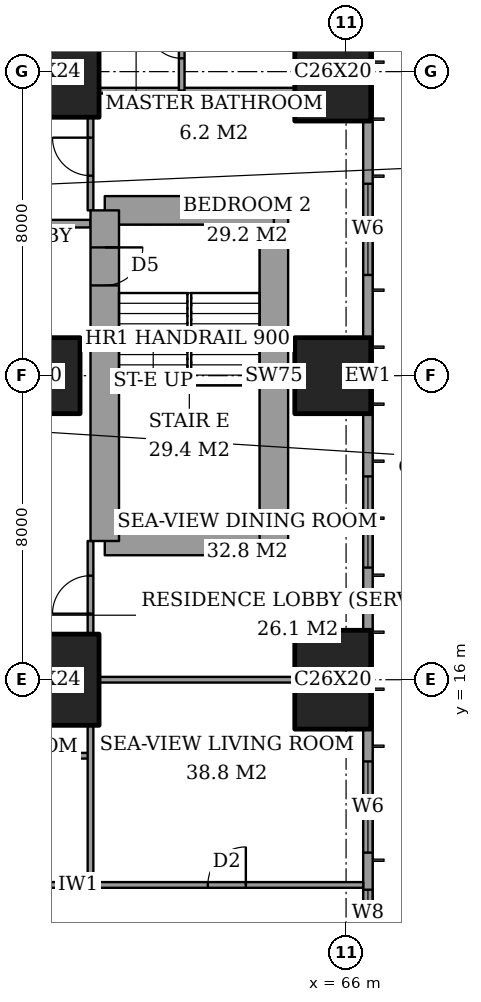
"""IFC4 building model, lengths in metres.
Left out: names, types, materials, properties, quantities, classifications, styles, units other than length and angle.
Written with IfcOpenShell. Run it as: python <this file> out.ifc"""

import sys

from ifc_helpers import new_model, si_unit, direction, frame, frame_2d, origin, origin_2d, place, context, subcontext, project, spatial, rectangle, extrude, element, fill, save


model = new_model("IFC4")
c1 = context("Model", 3, precision=1e-05, world=origin(), true_north=direction((0.0, 1.0)))
c2 = subcontext(c1, "Body", "Model", "MODEL_VIEW")
j1 = project(units=[si_unit("LENGTHUNIT", "METRE"), si_unit("PLANEANGLEUNIT", "RADIAN")], contexts=[c1])
p1 = place(None, origin())
s1 = spatial("IfcSite", under=j1, at=p1, CompositionType="ELEMENT")
p2 = place(p1, origin())
s2 = spatial("IfcBuilding", under=s1, at=p2, CompositionType="ELEMENT")
p3 = place(p2, frame((0.0, 0.0, 76.4)))
s3 = spatial("IfcBuildingStorey", under=s2, at=p3, CompositionType="ELEMENT", Elevation=76.4)
p4 = place(p3, frame((58.0, 16.0, 0.0), z_axis=(0.0, 0.0, 1.0), x_axis=(1.0, 0.0, 0.0)))
e1 = element("IfcColumn", 1, at=p4, inside=s3, PredefinedType="COLUMN", context=c2, shape_type="SweptSolid", body=[
    extrude(rectangle(XDim=3.0, YDim=2.4, at=origin_2d()), origin(), (0.0, 0.0, 1.0), 3.6),
])
p5 = place(p3, frame((58.0, 24.0, 0.0), z_axis=(0.0, 0.0, 1.0), x_axis=(1.0, 0.0, 0.0)))
e2 = element("IfcColumn", 2, at=p5, inside=s3, PredefinedType="COLUMN", context=c2, shape_type="SweptSolid", body=[
    extrude(rectangle(XDim=2.0, YDim=2.0, at=origin_2d()), origin(), (0.0, 0.0, 1.0), 3.6),
])
p6 = place(p3, frame((58.0, 32.0, 0.0), z_axis=(0.0, 0.0, 1.0), x_axis=(1.0, 0.0, 0.0)))
e3 = element("IfcColumn", 3, at=p6, inside=s3, PredefinedType="COLUMN", context=c2, shape_type="SweptSolid", body=[
    extrude(rectangle(XDim=3.0, YDim=2.4, at=origin_2d()), origin(), (0.0, 0.0, 1.0), 3.6),
])
p7 = place(p3, frame((65.65, 16.0, 0.0), z_axis=(0.0, 0.0, 1.0), x_axis=(0.0, 1.0, 0.0)))
e4 = element("IfcColumn", 4, at=p7, inside=s3, PredefinedType="COLUMN", context=c2, shape_type="SweptSolid", body=[
    extrude(rectangle(XDim=2.6, YDim=2.0, at=origin_2d()), origin(), (0.0, 0.0, 1.0), 3.6),
])
p8 = place(p3, frame((65.65, 24.0, 0.0), z_axis=(0.0, 0.0, 1.0), x_axis=(1.0, 0.0, 0.0)))
e5 = element("IfcColumn", 5, at=p8, inside=s3, PredefinedType="COLUMN", context=c2, shape_type="SweptSolid", body=[
    extrude(rectangle(XDim=2.0, YDim=2.0, at=origin_2d()), origin(), (0.0, 0.0, 1.0), 3.6),
])
p9 = place(p3, frame((65.65, 32.0, 0.0), z_axis=(0.0, 0.0, 1.0), x_axis=(0.0, 1.0, 0.0)))
e6 = element("IfcColumn", 6, at=p9, inside=s3, PredefinedType="COLUMN", context=c2, shape_type="SweptSolid", body=[
    extrude(rectangle(XDim=2.6, YDim=2.0, at=origin_2d()), origin(), (0.0, 0.0, 1.0), 3.6),
])
p10 = place(p3, frame((59.65, 19.65, 0.0), z_axis=(0.0, 0.0, 1.0), x_axis=(1.0, 0.0, 0.0)))
e7 = element("IfcWall", 7, at=p10, inside=s3, PredefinedType="SHEAR", context=c2, shape_type="SweptSolid", body=[
    extrude(rectangle(XDim=4.45, YDim=0.75, at=frame_2d((2.225, 0.0))), origin(), (0.0, 0.0, 1.0), 3.6),
])
p11 = place(p3, frame((64.1, 19.65, 0.0), z_axis=(0.0, 0.0, 1.0), x_axis=(0.0, 1.0, 0.0)))
e8 = element("IfcWall", 8, at=p11, inside=s3, PredefinedType="SHEAR", context=c2, shape_type="SweptSolid", body=[
    extrude(rectangle(XDim=8.7, YDim=0.75, at=frame_2d((4.35, 0.0))), origin(), (0.0, 0.0, 1.0), 3.6),
])
p12 = place(p3, frame((64.1, 28.35, 0.0), z_axis=(0.0, 0.0, 1.0), x_axis=(-1.0, 0.0, 0.0)))
e9 = element("IfcWall", 9, at=p12, inside=s3, PredefinedType="SHEAR", context=c2, shape_type="SweptSolid", body=[
    extrude(rectangle(XDim=4.45, YDim=0.75, at=frame_2d((2.225, 0.0))), origin(), (0.0, 0.0, 1.0), 3.6),
])
p13 = place(p3, frame((59.65, 28.35, 0.0), z_axis=(0.0, 0.0, 1.0), x_axis=(0.0, -1.0, 0.0)))
e10 = element("IfcWall", 10, at=p13, inside=s3, PredefinedType="SHEAR", context=c2, shape_type="SweptSolid", body=[
    extrude(rectangle(XDim=8.7, YDim=0.75, at=frame_2d((4.35, 0.0))), origin(), (0.0, 0.0, 1.0), 3.6),
])
p14 = place(p13, frame((0.975, 0.0, 0.0)))
e11 = element("IfcOpeningElement", 11, at=p14, cuts=e10, PredefinedType="OPENING", context=c2, shape_type="SweptSolid", body=[
    extrude(rectangle(XDim=1.0, YDim=2.1, at=frame_2d((0.5, 1.05))), frame((0.0, 0.385, 0.0), z_axis=(0.0, -1.0, 0.0), x_axis=(1.0, 0.0, 0.0)), (0.0, 0.0, 1.0), 0.77),
])
p15 = place(p3, frame((66.575, 3.175, 0.0), z_axis=(0.0, 0.0, 1.0), x_axis=(0.0, 1.0, 0.0)))
e12 = element("IfcWall", 12, at=p15, inside=s3, PredefinedType="SOLIDWALL", context=c2, shape_type="SweptSolid", body=[
    extrude(rectangle(XDim=41.65, YDim=0.25, at=frame_2d((20.825, 0.0))), origin(), (0.0, 0.0, 1.0), 3.6),
])
p16 = place(p15, frame((0.775, 0.0, 0.6)))
e13 = element("IfcOpeningElement", 13, at=p16, cuts=e12, PredefinedType="OPENING", context=c2, shape_type="SweptSolid", body=[
    extrude(rectangle(XDim=2.4, YDim=2.0, at=frame_2d((1.2, 1.0))), frame((0.0, 0.135, 0.0), z_axis=(0.0, -1.0, 0.0), x_axis=(1.0, 0.0, 0.0)), (0.0, 0.0, 1.0), 0.27),
])
p17 = place(p15, frame((6.1, 0.0, 0.6)))
e14 = element("IfcOpeningElement", 14, at=p17, cuts=e12, PredefinedType="OPENING", context=c2, shape_type="SweptSolid", body=[
    extrude(rectangle(XDim=1.2, YDim=2.0, at=frame_2d((0.6, 1.0))), frame((0.0, 0.135, 0.0), z_axis=(0.0, -1.0, 0.0), x_axis=(1.0, 0.0, 0.0)), (0.0, 0.0, 1.0), 0.27),
])
p18 = place(p15, frame((8.275, 0.0, 0.6)))
e15 = element("IfcOpeningElement", 15, at=p18, cuts=e12, PredefinedType="OPENING", context=c2, shape_type="SweptSolid", body=[
    extrude(rectangle(XDim=2.4, YDim=2.0, at=frame_2d((1.2, 1.0))), frame((0.0, 0.135, 0.0), z_axis=(0.0, -1.0, 0.0), x_axis=(1.0, 0.0, 0.0)), (0.0, 0.0, 1.0), 0.27),
])
p19 = place(p15, frame((15.775, 0.0, 0.6)))
e16 = element("IfcOpeningElement", 16, at=p19, cuts=e12, PredefinedType="OPENING", context=c2, shape_type="SweptSolid", body=[
    extrude(rectangle(XDim=2.4, YDim=2.0, at=frame_2d((1.2, 1.0))), frame((0.0, 0.135, 0.0), z_axis=(0.0, -1.0, 0.0), x_axis=(1.0, 0.0, 0.0)), (0.0, 0.0, 1.0), 0.27),
])
p20 = place(p15, frame((23.475, 0.0, 0.6)))
e17 = element("IfcOpeningElement", 17, at=p20, cuts=e12, PredefinedType="OPENING", context=c2, shape_type="SweptSolid", body=[
    extrude(rectangle(XDim=2.4, YDim=2.0, at=frame_2d((1.2, 1.0))), frame((0.0, 0.135, 0.0), z_axis=(0.0, -1.0, 0.0), x_axis=(1.0, 0.0, 0.0)), (0.0, 0.0, 1.0), 0.27),
])
p21 = place(p15, frame((30.975, 0.0, 0.6)))
e18 = element("IfcOpeningElement", 18, at=p21, cuts=e12, PredefinedType="OPENING", context=c2, shape_type="SweptSolid", body=[
    extrude(rectangle(XDim=2.4, YDim=2.0, at=frame_2d((1.2, 1.0))), frame((0.0, 0.135, 0.0), z_axis=(0.0, -1.0, 0.0), x_axis=(1.0, 0.0, 0.0)), (0.0, 0.0, 1.0), 0.27),
])
p22 = place(p15, frame((34.5, 0.0, 0.6)))
e19 = element("IfcOpeningElement", 19, at=p22, cuts=e12, PredefinedType="OPENING", context=c2, shape_type="SweptSolid", body=[
    extrude(rectangle(XDim=1.2, YDim=2.0, at=frame_2d((0.6, 1.0))), frame((0.0, 0.135, 0.0), z_axis=(0.0, -1.0, 0.0), x_axis=(1.0, 0.0, 0.0)), (0.0, 0.0, 1.0), 0.27),
])
p23 = place(p15, frame((38.475, 0.0, 0.6)))
e20 = element("IfcOpeningElement", 20, at=p23, cuts=e12, PredefinedType="OPENING", context=c2, shape_type="SweptSolid", body=[
    extrude(rectangle(XDim=2.4, YDim=2.0, at=frame_2d((1.2, 1.0))), frame((0.0, 0.135, 0.0), z_axis=(0.0, -1.0, 0.0), x_axis=(1.0, 0.0, 0.0)), (0.0, 0.0, 1.0), 0.27),
])
p24 = place(p3, frame((41.439, 10.6, 0.0), z_axis=(0.0, 0.0, 1.0), x_axis=(1.0, 0.0, 0.0)))
e21 = element("IfcWall", 21, at=p24, inside=s3, PredefinedType="PARTITIONING", context=c2, shape_type="SweptSolid", body=[
    extrude(rectangle(XDim=25.011, YDim=0.15, at=frame_2d((12.505, 0.0))), origin(), (0.0, 0.0, 1.0), 3.35),
])
p25 = place(p24, frame((10.761, 0.0, 0.0)))
e22 = element("IfcOpeningElement", 22, at=p25, cuts=e21, PredefinedType="OPENING", context=c2, shape_type="SweptSolid", body=[
    extrude(rectangle(XDim=1.0, YDim=2.1, at=frame_2d((0.5, 1.05))), frame((0.0, 0.085, 0.0), z_axis=(0.0, -1.0, 0.0), x_axis=(1.0, 0.0, 0.0)), (0.0, 0.0, 1.0), 0.17),
])
p26 = place(p24, frame((20.924, 0.0, 0.0)))
e23 = element("IfcOpeningElement", 23, at=p26, cuts=e21, PredefinedType="OPENING", context=c2, shape_type="SweptSolid", body=[
    extrude(rectangle(XDim=1.0, YDim=2.1, at=frame_2d((0.5, 1.05))), frame((0.0, 0.085, 0.0), z_axis=(0.0, -1.0, 0.0), x_axis=(1.0, 0.0, 0.0)), (0.0, 0.0, 1.0), 0.17),
])
p27 = place(p24, frame((15.749, 0.0, 0.0)))
e24 = element("IfcOpeningElement", 24, at=p27, cuts=e21, PredefinedType="OPENING", context=c2, shape_type="SweptSolid", body=[
    extrude(rectangle(XDim=0.9, YDim=2.1, at=frame_2d((0.45, 1.05))), frame((0.0, 0.085, 0.0), z_axis=(0.0, -1.0, 0.0), x_axis=(1.0, 0.0, 0.0)), (0.0, 0.0, 1.0), 0.17),
])
p28 = place(p24, frame((12.961, 0.0, 0.0)))
e25 = element("IfcOpeningElement", 25, at=p28, cuts=e21, PredefinedType="OPENING", context=c2, shape_type="SweptSolid", body=[
    extrude(rectangle(XDim=1.0, YDim=2.1, at=frame_2d((0.5, 1.05))), frame((0.0, 0.085, 0.0), z_axis=(0.0, -1.0, 0.0), x_axis=(1.0, 0.0, 0.0)), (0.0, 0.0, 1.0), 0.17),
])
p29 = place(p24, frame((7.861, 0.0, 0.0)))
e26 = element("IfcOpeningElement", 26, at=p29, cuts=e21, PredefinedType="OPENING", context=c2, shape_type="SweptSolid", body=[
    extrude(rectangle(XDim=1.0, YDim=2.1, at=frame_2d((0.5, 1.05))), frame((0.0, 0.085, 0.0), z_axis=(0.0, -1.0, 0.0), x_axis=(1.0, 0.0, 0.0)), (0.0, 0.0, 1.0), 0.17),
])
p30 = place(p24, frame((2.836, 0.0, 0.0)))
e27 = element("IfcOpeningElement", 27, at=p30, cuts=e21, PredefinedType="OPENING", context=c2, shape_type="SweptSolid", body=[
    extrude(rectangle(XDim=1.0, YDim=2.1, at=frame_2d((0.5, 1.05))), frame((0.0, 0.085, 0.0), z_axis=(0.0, -1.0, 0.0), x_axis=(1.0, 0.0, 0.0)), (0.0, 0.0, 1.0), 0.17),
])
p31 = place(p3, frame((56.0, 14.0, 0.0), z_axis=(0.0, 0.0, 1.0), x_axis=(1.0, 0.0, 0.0)))
e28 = element("IfcWall", 28, at=p31, inside=s3, PredefinedType="PARTITIONING", context=c2, shape_type="SweptSolid", body=[
    extrude(rectangle(XDim=3.275, YDim=0.15, at=frame_2d((1.637, 0.0))), origin(), (0.0, 0.0, 1.0), 3.35),
])
p32 = place(p3, frame((59.5, 16.0, 0.0), z_axis=(0.0, 0.0, 1.0), x_axis=(1.0, 0.0, 0.0)))
e29 = element("IfcWall", 29, at=p32, inside=s3, PredefinedType="PARTITIONING", context=c2, shape_type="SweptSolid", body=[
    extrude(rectangle(XDim=5.15, YDim=0.15, at=frame_2d((2.575, 0.0))), origin(), (0.0, 0.0, 1.0), 2.634),
])
p33 = place(p3, frame((42.0, 28.0, 0.0), z_axis=(0.0, 0.0, 1.0), x_axis=(1.0, 0.0, 0.0)))
e30 = element("IfcWall", 30, at=p33, inside=s3, PredefinedType="PARTITIONING", context=c2, shape_type="SweptSolid", body=[
    extrude(rectangle(XDim=17.275, YDim=0.2, at=frame_2d((8.637, 0.0))), origin(), (0.0, 0.0, 1.0), 3.35),
])
p34 = place(p33, frame((9.5, 0.0, 0.0)))
e31 = element("IfcOpeningElement", 31, at=p34, cuts=e30, PredefinedType="OPENING", context=c2, shape_type="SweptSolid", body=[
    extrude(rectangle(XDim=1.2, YDim=2.4, at=frame_2d((0.6, 1.2))), frame((0.0, 0.11, 0.0), z_axis=(0.0, -1.0, 0.0), x_axis=(1.0, 0.0, 0.0)), (0.0, 0.0, 1.0), 0.22),
])
p35 = place(p3, frame((59.5, 31.5, 0.0), z_axis=(0.0, 0.0, 1.0), x_axis=(1.0, 0.0, 0.0)))
e32 = element("IfcWall", 32, at=p35, inside=s3, PredefinedType="PARTITIONING", context=c2, shape_type="SweptSolid", body=[
    extrude(rectangle(XDim=5.15, YDim=0.15, at=frame_2d((2.575, 0.0))), origin(), (0.0, 0.0, 1.0), 3.35),
])
p36 = place(p3, frame((59.275, 10.6, 0.0), z_axis=(0.0, 0.0, 1.0), x_axis=(0.0, 1.0, 0.0)))
e33 = element("IfcWall", 33, at=p36, inside=s3, PredefinedType="PARTITIONING", context=c2, shape_type="SweptSolid", body=[
    extrude(rectangle(XDim=4.2, YDim=0.15, at=frame_2d((2.1, 0.0))), origin(), (0.0, 0.0, 1.0), 3.35),
])
p37 = place(p3, frame((59.275, 17.2, 0.0), z_axis=(0.0, 0.0, 1.0), x_axis=(0.0, 1.0, 0.0)))
e34 = element("IfcWall", 34, at=p37, inside=s3, PredefinedType="PARTITIONING", context=c2, shape_type="SweptSolid", body=[
    extrude(rectangle(XDim=2.45, YDim=0.15, at=frame_2d((1.225, 0.0))), origin(), (0.0, 0.0, 1.0), 3.35),
])
p38 = place(p37, frame((0.538, 0.0, 0.0)))
e35 = element("IfcOpeningElement", 35, at=p38, cuts=e34, PredefinedType="OPENING", context=c2, shape_type="SweptSolid", body=[
    extrude(rectangle(XDim=1.0, YDim=2.1, at=frame_2d((0.5, 1.05))), frame((0.0, 0.085, 0.0), z_axis=(0.0, -1.0, 0.0), x_axis=(1.0, 0.0, 0.0)), (0.0, 0.0, 1.0), 0.17),
])
p39 = place(p3, frame((59.275, 28.35, 0.0), z_axis=(0.0, 0.0, 1.0), x_axis=(0.0, 1.0, 0.0)))
e36 = element("IfcWall", 36, at=p39, inside=s3, PredefinedType="PARTITIONING", context=c2, shape_type="SweptSolid", body=[
    extrude(rectangle(XDim=2.45, YDim=0.15, at=frame_2d((1.225, 0.0))), origin(), (0.0, 0.0, 1.0), 3.35),
])
p40 = place(p39, frame((0.913, 0.0, 0.0)))
e37 = element("IfcOpeningElement", 37, at=p40, cuts=e36, PredefinedType="OPENING", context=c2, shape_type="SweptSolid", body=[
    extrude(rectangle(XDim=1.0, YDim=2.1, at=frame_2d((0.5, 1.05))), frame((0.0, 0.085, 0.0), z_axis=(0.0, -1.0, 0.0), x_axis=(1.0, 0.0, 0.0)), (0.0, 0.0, 1.0), 0.17),
])
p41 = place(p3, frame((61.675, 31.5, 0.0), z_axis=(0.0, 0.0, 1.0), x_axis=(0.0, 1.0, 0.0)))
e38 = element("IfcWall", 38, at=p41, inside=s3, PredefinedType="PARTITIONING", context=c2, shape_type="SweptSolid", body=[
    extrude(rectangle(XDim=2.6, YDim=0.15, at=frame_2d((1.3, 0.0))), origin(), (0.0, 0.0, 1.0), 3.35),
])
p42 = place(p41, frame((0.85, 0.0, 0.0)))
e39 = element("IfcOpeningElement", 39, at=p42, cuts=e38, PredefinedType="OPENING", context=c2, shape_type="SweptSolid", body=[
    extrude(rectangle(XDim=0.9, YDim=2.1, at=frame_2d((0.45, 1.05))), frame((0.0, 0.085, 0.0), z_axis=(0.0, -1.0, 0.0), x_axis=(1.0, 0.0, 0.0)), (0.0, 0.0, 1.0), 0.17),
])
p43 = place(p17, origin())
e40 = element("IfcWindow", 40, at=p43, inside=s3, PartitioningType="SINGLE_PANEL", PredefinedType="WINDOW", context=c2, shape_type="SweptSolid", body=[
    extrude(rectangle(XDim=1.2, YDim=2.0, at=frame_2d((0.6, 1.0))), frame((0.0, 0.03, 0.0), z_axis=(0.0, -1.0, 0.0), x_axis=(1.0, 0.0, 0.0)), (0.0, 0.0, 1.0), 0.06),
])
fill(e14, e40)
p44 = place(p18, origin())
e41 = element("IfcWindow", 41, at=p44, inside=s3, PartitioningType="SINGLE_PANEL", PredefinedType="WINDOW", context=c2, shape_type="SweptSolid", body=[
    extrude(rectangle(XDim=2.4, YDim=2.0, at=frame_2d((1.2, 1.0))), frame((0.0, 0.03, 0.0), z_axis=(0.0, -1.0, 0.0), x_axis=(1.0, 0.0, 0.0)), (0.0, 0.0, 1.0), 0.06),
])
fill(e15, e41)
p45 = place(p19, origin())
e42 = element("IfcWindow", 42, at=p45, inside=s3, PartitioningType="SINGLE_PANEL", PredefinedType="WINDOW", context=c2, shape_type="SweptSolid", body=[
    extrude(rectangle(XDim=2.4, YDim=2.0, at=frame_2d((1.2, 1.0))), frame((0.0, 0.03, 0.0), z_axis=(0.0, -1.0, 0.0), x_axis=(1.0, 0.0, 0.0)), (0.0, 0.0, 1.0), 0.06),
])
fill(e16, e42)
p46 = place(p20, origin())
e43 = element("IfcWindow", 43, at=p46, inside=s3, PartitioningType="SINGLE_PANEL", PredefinedType="WINDOW", context=c2, shape_type="SweptSolid", body=[
    extrude(rectangle(XDim=2.4, YDim=2.0, at=frame_2d((1.2, 1.0))), frame((0.0, 0.03, 0.0), z_axis=(0.0, -1.0, 0.0), x_axis=(1.0, 0.0, 0.0)), (0.0, 0.0, 1.0), 0.06),
])
fill(e17, e43)
p47 = place(p26, origin())
e44 = element("IfcDoor", 44, at=p47, inside=s3, OperationType="SINGLE_SWING_LEFT", PredefinedType="DOOR", context=c2, shape_type="SweptSolid", body=[
    extrude(rectangle(XDim=1.0, YDim=2.1, at=frame_2d((0.5, 1.05))), frame((0.0, 0.025, 0.0), z_axis=(0.0, -1.0, 0.0), x_axis=(1.0, 0.0, 0.0)), (0.0, 0.0, 1.0), 0.05),
])
fill(e23, e44)
p48 = place(p38, origin())
e45 = element("IfcDoor", 45, at=p48, inside=s3, OperationType="SINGLE_SWING_RIGHT", PredefinedType="DOOR", context=c2, shape_type="SweptSolid", body=[
    extrude(rectangle(XDim=1.0, YDim=2.1, at=frame_2d((0.5, 1.05))), frame((0.0, 0.025, 0.0), z_axis=(0.0, -1.0, 0.0), x_axis=(1.0, 0.0, 0.0)), (0.0, 0.0, 1.0), 0.05),
])
fill(e35, e45)
p49 = place(p42, origin())
e46 = element("IfcDoor", 46, at=p49, inside=s3, OperationType="SINGLE_SWING_LEFT", PredefinedType="DOOR", context=c2, shape_type="SweptSolid", body=[
    extrude(rectangle(XDim=0.9, YDim=2.1, at=frame_2d((0.45, 1.05))), frame((0.0, 0.025, 0.0), z_axis=(0.0, -1.0, 0.0), x_axis=(1.0, 0.0, 0.0)), (0.0, 0.0, 1.0), 0.05),
])
fill(e39, e46)
p50 = place(p40, origin())
e47 = element("IfcDoor", 47, at=p50, inside=s3, OperationType="SINGLE_SWING_LEFT", PredefinedType="DOOR", context=c2, shape_type="SweptSolid", body=[
    extrude(rectangle(XDim=1.0, YDim=2.1, at=frame_2d((0.5, 1.05))), frame((0.0, 0.025, 0.0), z_axis=(0.0, -1.0, 0.0), x_axis=(1.0, 0.0, 0.0)), (0.0, 0.0, 1.0), 0.05),
])
fill(e37, e47)
p51 = place(p14, origin())
e48 = element("IfcDoor", 48, at=p51, inside=s3, OperationType="SINGLE_SWING_RIGHT", PredefinedType="DOOR", context=c2, shape_type="SweptSolid", body=[
    extrude(rectangle(XDim=1.0, YDim=2.1, at=frame_2d((0.5, 1.05))), frame((0.0, 0.025, 0.0), z_axis=(0.0, -1.0, 0.0), x_axis=(1.0, 0.0, 0.0)), (0.0, 0.0, 1.0), 0.05),
])
fill(e11, e48)
save(model, sys.argv[1])
